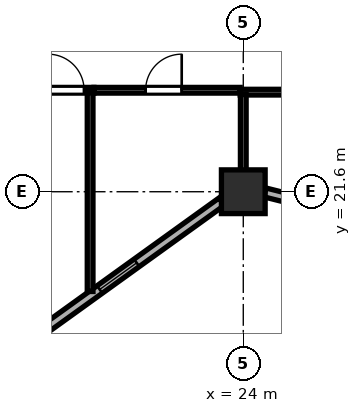
"""IFC4 building model, lengths in metres.
Left out: names, types, materials, properties, quantities, classifications, styles, units other than length and angle.
Written with IfcOpenShell. Run it as: python <this file> out.ifc"""

import sys

from ifc_helpers import new_model, si_unit, direction, frame, frame_2d, origin, origin_2d, place, context, subcontext, project, spatial, rectangle, hollow_rectangle, extrude, element, fill, save


model = new_model("IFC4")
c1 = context("Model", 3, precision=1e-05, world=origin(), true_north=direction((0.0, 1.0)))
c2 = subcontext(c1, "Body", "Model", "MODEL_VIEW")
j1 = project(units=[si_unit("LENGTHUNIT", "METRE"), si_unit("PLANEANGLEUNIT", "RADIAN")], contexts=[c1])
p1 = place(None, origin())
s1 = spatial("IfcSite", under=j1, at=p1, CompositionType="ELEMENT")
p2 = place(p1, origin())
s2 = spatial("IfcBuilding", under=s1, at=p2, CompositionType="ELEMENT")
p3 = place(p2, frame((0.0, 0.0, 47.6)))
s3 = spatial("IfcBuildingStorey", under=s2, at=p3, CompositionType="ELEMENT", Elevation=47.6)
p4 = place(p3, frame((24.0, 21.6, 0.0), z_axis=(0.0, 0.0, 1.0), x_axis=(1.0, 0.0, 0.0)))
e1 = element("IfcColumn", 1, at=p4, inside=s3, PredefinedType="COLUMN", context=c2, shape_type="SweptSolid", body=[
    extrude(hollow_rectangle(XDim=1.15, YDim=1.15, WallThickness=0.042, at=origin_2d()), origin(), (0.0, 0.0, 1.0), 3.8),
])
p5 = place(p3, frame((14.075, 14.602, 0.0), z_axis=(0.0, 0.0, 1.0), x_axis=(0.811543176492, 0.58429245476, 0.0)))
e2 = element("IfcWall", 2, at=p5, inside=s3, PredefinedType="SOLIDWALL", context=c2, shape_type="SweptSolid", body=[
    extrude(rectangle(XDim=11.531, YDim=0.24, at=frame_2d((5.765, 0.0))), origin(), (0.0, 0.0, 1.0), 3.097),
])
p6 = place(p5, frame((0.95, 0.0, 0.85)))
e3 = element("IfcOpeningElement", 3, at=p6, cuts=e2, PredefinedType="OPENING", context=c2, shape_type="SweptSolid", body=[
    extrude(rectangle(XDim=1.2, YDim=1.85, at=frame_2d((0.6, 0.925))), frame((0.0, 0.13, 0.0), z_axis=(0.0, -1.0, 0.0), x_axis=(1.0, 0.0, 0.0)), (0.0, 0.0, 1.0), 0.26),
])
p7 = place(p5, frame((7.574, 0.0, 0.85)))
e4 = element("IfcOpeningElement", 4, at=p7, cuts=e2, PredefinedType="OPENING", context=c2, shape_type="SweptSolid", body=[
    extrude(rectangle(XDim=1.2, YDim=1.85, at=frame_2d((0.6, 0.925))), frame((0.0, 0.13, 0.0), z_axis=(0.0, -1.0, 0.0), x_axis=(1.0, 0.0, 0.0)), (0.0, 0.0, 1.0), 0.26),
])
p8 = place(p5, frame((4.262, 0.0, 0.85)))
e5 = element("IfcOpeningElement", 5, at=p8, cuts=e2, PredefinedType="OPENING", context=c2, shape_type="SweptSolid", body=[
    extrude(rectangle(XDim=1.2, YDim=1.85, at=frame_2d((0.6, 0.925))), frame((0.0, 0.13, 0.0), z_axis=(0.0, -1.0, 0.0), x_axis=(1.0, 0.0, 0.0)), (0.0, 0.0, 1.0), 0.26),
])
p9 = place(p3, frame((24.567, 21.582, 0.0), z_axis=(0.0, 0.0, 1.0), x_axis=(0.970148978127, -0.24250971164, 0.0)))
e6 = element("IfcWall", 6, at=p9, inside=s3, PredefinedType="SOLIDWALL", context=c2, shape_type="SweptSolid", body=[
    extrude(rectangle(XDim=4.434, YDim=0.24, at=frame_2d((2.217, 0.0))), origin(), (0.0, 0.0, 1.0), 3.097),
])
p10 = place(p9, frame((1.6, 0.0, 0.85)))
e7 = element("IfcOpeningElement", 7, at=p10, cuts=e6, PredefinedType="OPENING", context=c2, shape_type="SweptSolid", body=[
    extrude(rectangle(XDim=1.2, YDim=1.85, at=frame_2d((0.6, 0.925))), frame((0.0, 0.13, 0.0), z_axis=(0.0, -1.0, 0.0), x_axis=(1.0, 0.0, 0.0)), (0.0, 0.0, 1.0), 0.26),
])
p11 = place(p3, frame((23.92, 24.22, 0.0), z_axis=(0.0, 0.0, 1.0), x_axis=(1.0, 0.0, 0.0)))
e8 = element("IfcWall", 8, at=p11, inside=s3, PredefinedType="PARTITIONING", context=c2, shape_type="SweptSolid", body=[
    extrude(rectangle(XDim=3.96, YDim=0.15, at=frame_2d((1.98, 0.0))), origin(), (0.0, 0.0, 1.0), 3.6),
])
p12 = place(p11, frame((2.375, 0.0, 0.0), z_axis=(0.0, 0.0, 1.0), x_axis=(-1.0, 0.0, 0.0)))
e9 = element("IfcOpeningElement", 9, at=p12, cuts=e8, PredefinedType="OPENING", context=c2, shape_type="SweptSolid", body=[
    extrude(rectangle(XDim=0.95, YDim=2.12, at=frame_2d((0.475, 1.06))), frame((0.0, 0.085, 0.0), z_axis=(0.0, -1.0, 0.0), x_axis=(1.0, 0.0, 0.0)), (0.0, 0.0, 1.0), 0.17),
])
p13 = place(p3, frame((24.0, 21.819, 0.0), z_axis=(0.0, 0.0, 1.0), x_axis=(0.0, 1.0, 0.0)))
e10 = element("IfcWall", 10, at=p13, inside=s3, PredefinedType="PARTITIONING", context=c2, shape_type="SweptSolid", body=[
    extrude(rectangle(XDim=2.341, YDim=0.15, at=frame_2d((1.171, 0.0))), origin(), (0.0, 0.0, 1.0), 3.097),
])
p14 = place(p3, frame((16.052, 24.27, 0.0), z_axis=(0.0, 0.0, 1.0), x_axis=(1.0, 0.0, 0.0)))
e11 = element("IfcWall", 11, at=p14, inside=s3, PredefinedType="PARTITIONING", context=c2, shape_type="SweptSolid", body=[
    extrude(rectangle(XDim=4.018, YDim=0.15, at=frame_2d((2.009, 0.0))), origin(), (0.0, 0.0, 1.0), 3.6),
])
p15 = place(p14, frame((3.76, 0.0, 0.0), z_axis=(0.0, 0.0, 1.0), x_axis=(-1.0, 0.0, 0.0)))
e12 = element("IfcOpeningElement", 12, at=p15, cuts=e11, PredefinedType="OPENING", context=c2, shape_type="SweptSolid", body=[
    extrude(rectangle(XDim=0.95, YDim=2.15, at=frame_2d((0.475, 1.075))), frame((0.0, 0.085, 0.0), z_axis=(0.0, -1.0, 0.0), x_axis=(1.0, 0.0, 0.0)), (0.0, 0.0, 1.0), 0.17),
])
p16 = place(p3, frame((19.97, 18.976, 0.0), z_axis=(0.0, 0.0, 1.0), x_axis=(0.0, 1.0, 0.0)))
e13 = element("IfcWall", 13, at=p16, inside=s3, PredefinedType="PARTITIONING", context=c2, shape_type="SweptSolid", body=[
    extrude(rectangle(XDim=5.234, YDim=0.15, at=frame_2d((2.617, 0.0))), origin(), (0.0, 0.0, 1.0), 3.6),
])
p17 = place(p3, frame((20.072, 24.27, 0.0), z_axis=(0.0, 0.0, 1.0), x_axis=(1.0, 0.0, 0.0)))
e14 = element("IfcWall", 14, at=p17, inside=s3, PredefinedType="PARTITIONING", context=c2, shape_type="SweptSolid", body=[
    extrude(rectangle(XDim=3.846, YDim=0.15, at=frame_2d((1.923, 0.0))), origin(), (0.0, 0.0, 1.0), 3.6),
])
p18 = place(p17, frame((2.308, 0.0, 0.0), z_axis=(0.0, 0.0, 1.0), x_axis=(-1.0, 0.0, 0.0)))
e15 = element("IfcOpeningElement", 15, at=p18, cuts=e14, PredefinedType="OPENING", context=c2, shape_type="SweptSolid", body=[
    extrude(rectangle(XDim=0.95, YDim=2.12, at=frame_2d((0.475, 1.06))), frame((0.0, 0.085, 0.0), z_axis=(0.0, -1.0, 0.0), x_axis=(1.0, 0.0, 0.0)), (0.0, 0.0, 1.0), 0.17),
])
p19 = place(p7, origin())
e16 = element("IfcWindow", 16, at=p19, inside=s3, PartitioningType="SINGLE_PANEL", PredefinedType="WINDOW", context=c2, shape_type="SweptSolid", body=[
    extrude(rectangle(XDim=1.2, YDim=1.85, at=frame_2d((0.6, 0.925))), frame((0.0, 0.03, 0.0), z_axis=(0.0, -1.0, 0.0), x_axis=(1.0, 0.0, 0.0)), (0.0, 0.0, 1.0), 0.06),
])
fill(e4, e16)
p20 = place(p15, origin())
e17 = element("IfcDoor", 17, at=p20, inside=s3, OperationType="SINGLE_SWING_RIGHT", PredefinedType="DOOR", context=c2, shape_type="SweptSolid", body=[
    extrude(rectangle(XDim=0.95, YDim=2.15, at=frame_2d((0.475, 1.075))), frame((0.0, 0.025, 0.0), z_axis=(0.0, -1.0, 0.0), x_axis=(1.0, 0.0, 0.0)), (0.0, 0.0, 1.0), 0.05),
])
fill(e12, e17)
p21 = place(p18, origin())
e18 = element("IfcDoor", 18, at=p21, inside=s3, OperationType="SINGLE_SWING_LEFT", PredefinedType="DOOR", context=c2, shape_type="SweptSolid", body=[
    extrude(rectangle(XDim=0.95, YDim=2.12, at=frame_2d((0.475, 1.06))), frame((0.0, 0.025, 0.0), z_axis=(0.0, -1.0, 0.0), x_axis=(1.0, 0.0, 0.0)), (0.0, 0.0, 1.0), 0.05),
])
fill(e15, e18)
save(model, sys.argv[1])
